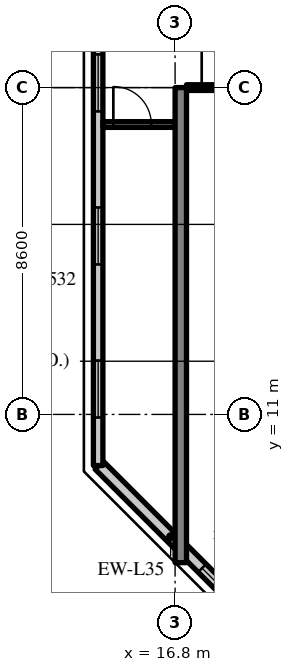
"""IFC4 building model, lengths in metres.
Left out: names, types, materials, properties, quantities, classifications, styles, units other than length and angle.
Written with IfcOpenShell. Run it as: python <this file> out.ifc"""

import sys

from ifc_helpers import new_model, si_unit, direction, frame, frame_2d, origin, place, context, subcontext, project, spatial, rectangle, extrude, source, transform, mapped, element, fill, save


model = new_model("IFC4")
c1 = context("Model", 3, precision=1e-05, world=origin(), true_north=direction((0.0, 1.0)))
c2 = subcontext(c1, "Body", "Model", "MODEL_VIEW")
j1 = project(units=[si_unit("LENGTHUNIT", "METRE"), si_unit("PLANEANGLEUNIT", "RADIAN")], contexts=[c1])
p1 = place(None, origin())
s1 = spatial("IfcSite", under=j1, at=p1, CompositionType="ELEMENT")
p2 = place(p1, origin())
s2 = spatial("IfcBuilding", under=s1, at=p2, CompositionType="ELEMENT")
p3 = place(p2, frame((0.0, 0.0, 229.6)))
s3 = spatial("IfcBuildingStorey", under=s2, at=p3, CompositionType="ELEMENT", Elevation=229.6)
m1 = source(origin(), c2, "Body", "SweptSolid", [
    extrude(rectangle(XDim=12.5, YDim=0.3, at=frame_2d((6.25, 0.0))), origin(), (0.0, 0.0, 1.0), 3.62),
])
p4 = place(p3, frame((16.95, 7.1, 0.0), z_axis=(0.0, 0.0, 1.0), x_axis=(0.0, 1.0, 0.0)))
e1 = element("IfcWall", 1, at=p4, inside=s3, PredefinedType="SHEAR", context=c2, shape_type="MappedRepresentation", body=[
    mapped(m1, transform((0.0, 0.0, 0.0), scale=1.0)),
])
m2 = source(origin(), c2, "Body", "SweptSolid", [
    extrude(rectangle(XDim=5.326, YDim=0.3, at=frame_2d((2.663, 0.0))), origin(), (0.0, 0.0, 1.0), 3.62),
])
p5 = place(p3, frame((14.8, 9.666, 0.0), z_axis=(0.0, 0.0, 1.0), x_axis=(0.707083859269, -0.707129702361, 0.0)))
e2 = element("IfcWall", 2, at=p5, inside=s3, PredefinedType="SOLIDWALL", context=c2, shape_type="MappedRepresentation", body=[
    mapped(m2, transform((0.0, 0.0, 0.0), scale=1.0)),
])
m3 = source(origin(), c2, "Body", "SweptSolid", [
    extrude(rectangle(XDim=1.2, YDim=1.5, at=frame_2d((0.6, 0.75))), frame((0.0, 0.16, 0.0), z_axis=(0.0, -1.0, 0.0), x_axis=(1.0, 0.0, 0.0)), (0.0, 0.0, 1.0), 0.32),
])
p6 = place(p5, frame((3.833, 0.0, 0.9)))
e3 = element("IfcOpeningElement", 3, at=p6, cuts=e2, PredefinedType="OPENING", context=c2, shape_type="MappedRepresentation", body=[
    mapped(m3, transform((0.0, 0.0, 0.0), scale=1.0)),
])
m4 = source(origin(), c2, "Body", "SweptSolid", [
    extrude(rectangle(XDim=28.189, YDim=0.25, at=frame_2d((14.095, 0.0))), origin(), (0.0, 0.0, 1.0), 3.62),
])
p7 = place(p3, frame((14.775, 37.845, 0.0), z_axis=(0.0, 0.0, 1.0), x_axis=(0.0, -1.0, 0.0)))
e4 = element("IfcWall", 4, at=p7, inside=s3, PredefinedType="SOLIDWALL", context=c2, shape_type="MappedRepresentation", body=[
    mapped(m4, transform((0.0, 0.0, 0.0), scale=1.0)),
])
m5 = source(origin(), c2, "Body", "SweptSolid", [
    extrude(rectangle(XDim=1.5, YDim=1.5, at=frame_2d((0.75, 0.75))), frame((0.0, 0.135, 0.0), z_axis=(0.0, -1.0, 0.0), x_axis=(1.0, 0.0, 0.0)), (0.0, 0.0, 1.0), 0.27),
])
p8 = place(p7, frame((1.263, 0.0, 0.9)))
e5 = element("IfcOpeningElement", 5, at=p8, cuts=e4, PredefinedType="OPENING", context=c2, shape_type="MappedRepresentation", body=[
    mapped(m5, transform((0.0, 0.0, 0.0), scale=1.0)),
])
p9 = place(p7, frame((5.291, 0.0, 0.9)))
e6 = element("IfcOpeningElement", 6, at=p9, cuts=e4, PredefinedType="OPENING", context=c2, shape_type="MappedRepresentation", body=[
    mapped(m5, transform((0.0, 0.0, 0.0), scale=1.0)),
])
p10 = place(p7, frame((9.318, 0.0, 0.9)))
e7 = element("IfcOpeningElement", 7, at=p10, cuts=e4, PredefinedType="OPENING", context=c2, shape_type="MappedRepresentation", body=[
    mapped(m5, transform((0.0, 0.0, 0.0), scale=1.0)),
])
p11 = place(p7, frame((13.345, 0.0, 0.9)))
e8 = element("IfcOpeningElement", 8, at=p11, cuts=e4, PredefinedType="OPENING", context=c2, shape_type="MappedRepresentation", body=[
    mapped(m5, transform((0.0, 0.0, 0.0), scale=1.0)),
])
p12 = place(p7, frame((17.372, 0.0, 0.9)))
e9 = element("IfcOpeningElement", 9, at=p12, cuts=e4, PredefinedType="OPENING", context=c2, shape_type="MappedRepresentation", body=[
    mapped(m5, transform((0.0, 0.0, 0.0), scale=1.0)),
])
p13 = place(p7, frame((21.399, 0.0, 0.9)))
e10 = element("IfcOpeningElement", 10, at=p13, cuts=e4, PredefinedType="OPENING", context=c2, shape_type="MappedRepresentation", body=[
    mapped(m5, transform((0.0, 0.0, 0.0), scale=1.0)),
])
p14 = place(p7, frame((25.426, 0.0, 0.9)))
e11 = element("IfcOpeningElement", 11, at=p14, cuts=e4, PredefinedType="OPENING", context=c2, shape_type="MappedRepresentation", body=[
    mapped(m5, transform((0.0, 0.0, 0.0), scale=1.0)),
])
m6 = source(origin(), c2, "Body", "SweptSolid", [
    extrude(rectangle(XDim=3.825, YDim=0.15, at=frame_2d((1.913, 0.0))), origin(), (0.0, 0.0, 1.0), 2.92),
])
p15 = place(p3, frame((17.1, 19.6, 0.0), z_axis=(0.0, 0.0, 1.0), x_axis=(1.0, 0.0, 0.0)))
e12 = element("IfcWall", 12, at=p15, inside=s3, PredefinedType="PARTITIONING", context=c2, shape_type="MappedRepresentation", body=[
    mapped(m6, transform((0.0, 0.0, 0.0), scale=1.0)),
])
m7 = source(origin(), c2, "Body", "SweptSolid", [
    extrude(rectangle(XDim=1.0, YDim=2.1, at=frame_2d((0.5, 1.05))), frame((0.0, 0.085, 0.0), z_axis=(0.0, -1.0, 0.0), x_axis=(1.0, 0.0, 0.0)), (0.0, 0.0, 1.0), 0.17),
])
p16 = place(p15, frame((0.4, 0.0, 0.0)))
e13 = element("IfcOpeningElement", 13, at=p16, cuts=e12, PredefinedType="OPENING", context=c2, shape_type="MappedRepresentation", body=[
    mapped(m7, transform((0.0, 0.0, 0.0), scale=1.0)),
])
m8 = source(origin(), c2, "Body", "SweptSolid", [
    extrude(rectangle(XDim=1.9, YDim=0.15, at=frame_2d((0.95, 0.0))), origin(), (0.0, 0.0, 1.0), 2.92),
])
p17 = place(p3, frame((14.9, 18.628, 0.0), z_axis=(0.0, 0.0, 1.0), x_axis=(1.0, 0.0, 0.0)))
e14 = element("IfcWall", 14, at=p17, inside=s3, PredefinedType="PARTITIONING", context=c2, shape_type="MappedRepresentation", body=[
    mapped(m8, transform((0.0, 0.0, 0.0), scale=1.0)),
])
p18 = place(p17, frame((0.275, 0.0, 0.0)))
e15 = element("IfcOpeningElement", 15, at=p18, cuts=e14, PredefinedType="OPENING", context=c2, shape_type="MappedRepresentation", body=[
    mapped(m7, transform((0.0, 0.0, 0.0), scale=1.0)),
])
m9 = source(origin(), c2, "Body", "SweptSolid", [
    extrude(rectangle(XDim=1.2, YDim=1.5, at=frame_2d((0.6, 0.75))), frame((0.0, 0.03, 0.0), z_axis=(0.0, -1.0, 0.0), x_axis=(1.0, 0.0, 0.0)), (0.0, 0.0, 1.0), 0.06),
])
p19 = place(p6, origin())
e16 = element("IfcWindow", 16, at=p19, inside=s3, PartitioningType="SINGLE_PANEL", PredefinedType="WINDOW", context=c2, shape_type="MappedRepresentation", body=[
    mapped(m9, transform((0.0, 0.0, 0.0), scale=1.0)),
])
fill(e3, e16)
m10 = source(origin(), c2, "Body", "SweptSolid", [
    extrude(rectangle(XDim=1.5, YDim=1.5, at=frame_2d((0.75, 0.75))), frame((0.0, 0.03, 0.0), z_axis=(0.0, -1.0, 0.0), x_axis=(1.0, 0.0, 0.0)), (0.0, 0.0, 1.0), 0.06),
])
p20 = place(p12, origin())
e17 = element("IfcWindow", 17, at=p20, inside=s3, PartitioningType="SINGLE_PANEL", PredefinedType="WINDOW", context=c2, shape_type="MappedRepresentation", body=[
    mapped(m10, transform((0.0, 0.0, 0.0), scale=1.0)),
])
fill(e9, e17)
p21 = place(p13, origin())
e18 = element("IfcWindow", 18, at=p21, inside=s3, PartitioningType="SINGLE_PANEL", PredefinedType="WINDOW", context=c2, shape_type="MappedRepresentation", body=[
    mapped(m10, transform((0.0, 0.0, 0.0), scale=1.0)),
])
fill(e10, e18)
p22 = place(p14, origin())
e19 = element("IfcWindow", 19, at=p22, inside=s3, PartitioningType="SINGLE_PANEL", PredefinedType="WINDOW", context=c2, shape_type="MappedRepresentation", body=[
    mapped(m10, transform((0.0, 0.0, 0.0), scale=1.0)),
])
fill(e11, e19)
m11 = source(origin(), c2, "Body", "SweptSolid", [
    extrude(rectangle(XDim=1.0, YDim=2.1, at=frame_2d((0.5, 1.05))), frame((0.0, 0.025, 0.0), z_axis=(0.0, -1.0, 0.0), x_axis=(1.0, 0.0, 0.0)), (0.0, 0.0, 1.0), 0.05),
])
p23 = place(p16, origin())
e20 = element("IfcDoor", 20, at=p23, inside=s3, OperationType="SINGLE_SWING_LEFT", PredefinedType="DOOR", context=c2, shape_type="MappedRepresentation", body=[
    mapped(m11, transform((0.0, 0.0, 0.0), scale=1.0)),
])
fill(e13, e20)
p24 = place(p18, origin())
e21 = element("IfcDoor", 21, at=p24, inside=s3, OperationType="SINGLE_SWING_LEFT", PredefinedType="DOOR", context=c2, shape_type="MappedRepresentation", body=[
    mapped(m11, transform((0.0, 0.0, 0.0), scale=1.0)),
])
fill(e15, e21)
save(model, sys.argv[1])
